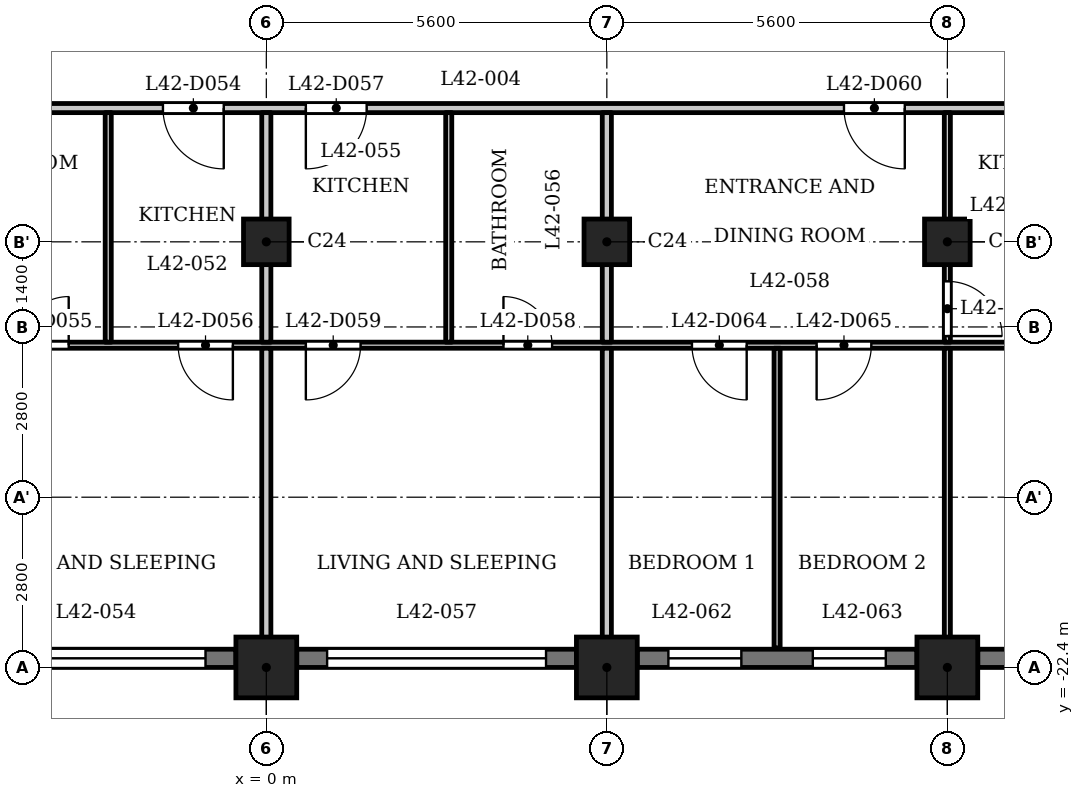
"""IFC4 building model, lengths in metres.
Left out: names, types, materials, properties, quantities, classifications, styles, units other than length and angle.
Written with IfcOpenShell. Run it as: python <this file> out.ifc"""

import sys

from ifc_helpers import new_model, si_unit, direction, frame, frame_2d, origin, origin_2d, place, context, subcontext, project, spatial, rectangle, extrude, element, fill, save


model = new_model("IFC4")
c1 = context("Model", 3, precision=1e-05, world=origin(), true_north=direction((0.0, 1.0)))
c2 = subcontext(c1, "Body", "Model", "MODEL_VIEW")
j1 = project(units=[si_unit("LENGTHUNIT", "METRE"), si_unit("PLANEANGLEUNIT", "RADIAN")], contexts=[c1])
p1 = place(None, origin())
s1 = spatial("IfcSite", under=j1, at=p1, CompositionType="ELEMENT")
p2 = place(p1, origin())
s2 = spatial("IfcBuilding", under=s1, at=p2, CompositionType="ELEMENT")
p3 = place(p2, frame((0.0, 0.0, 164.1)))
s3 = spatial("IfcBuildingStorey", under=s2, at=p3, CompositionType="ELEMENT", Elevation=164.1)
for number, where, z_axis, x_axis in (
    (1, (0.0, -22.4, 0.0), (0.0, 0.0, 1.0), (1.0, 0.0, 0.0)),
    (2, (5.6, -22.4, 0.0), (0.0, 0.0, 1.0), (1.0, 0.0, 0.0)),
    (3, (11.2, -22.4, 0.0), (0.0, 0.0, 1.0), (1.0, 0.0, 0.0)),
):
    element("IfcColumn", number, at=place(p3, frame(where, z_axis=z_axis, x_axis=x_axis)), inside=s3, PredefinedType="COLUMN", context=c2, shape_type="SweptSolid", body=[
        extrude(rectangle(XDim=1.0, YDim=1.0, at=origin_2d()), origin(), (0.0, 0.0, 1.0), 3.5),
    ])
for number, where, z_axis, x_axis in (
    (4, (0.0, -15.4, 0.0), (0.0, 0.0, 1.0), (1.0, 0.0, 0.0)),
    (5, (5.6, -15.4, 0.0), (0.0, 0.0, 1.0), (1.0, 0.0, 0.0)),
    (6, (11.2, -15.4, 0.0), (0.0, 0.0, 1.0), (1.0, 0.0, 0.0)),
):
    element("IfcColumn", number, at=place(p3, frame(where, z_axis=z_axis, x_axis=x_axis)), inside=s3, PredefinedType="COLUMN", context=c2, shape_type="SweptSolid", body=[
        extrude(rectangle(XDim=0.75, YDim=0.75, at=origin_2d()), origin(), (0.0, 0.0, 1.0), 3.5),
    ])
p4 = place(p3, frame((-5.1, -22.25, 0.0), z_axis=(0.0, 0.0, 1.0), x_axis=(1.0, 0.0, 0.0)))
e7 = element("IfcWall", 7, at=p4, inside=s3, PredefinedType="SOLIDWALL", context=c2, shape_type="SweptSolid", body=[
    extrude(rectangle(XDim=4.6, YDim=0.3, at=frame_2d((2.3, 0.0))), origin(), (0.0, 0.0, 1.0), 2.45),
])
p5 = place(p4, frame((0.5, 0.0, 1.2)))
e8 = element("IfcOpeningElement", 8, at=p5, cuts=e7, PredefinedType="OPENING", context=c2, shape_type="SweptSolid", body=[
    extrude(rectangle(XDim=3.6, YDim=0.95, at=frame_2d((1.8, 0.475))), frame((0.0, 0.16, 0.0), z_axis=(0.0, -1.0, 0.0), x_axis=(1.0, 0.0, 0.0)), (0.0, 0.0, 1.0), 0.32),
])
p6 = place(p3, frame((0.5, -22.25, 0.0), z_axis=(0.0, 0.0, 1.0), x_axis=(1.0, 0.0, 0.0)))
e9 = element("IfcWall", 9, at=p6, inside=s3, PredefinedType="SOLIDWALL", context=c2, shape_type="SweptSolid", body=[
    extrude(rectangle(XDim=4.6, YDim=0.3, at=frame_2d((2.3, 0.0))), origin(), (0.0, 0.0, 1.0), 2.45),
])
p7 = place(p6, frame((0.5, 0.0, 1.2)))
e10 = element("IfcOpeningElement", 10, at=p7, cuts=e9, PredefinedType="OPENING", context=c2, shape_type="SweptSolid", body=[
    extrude(rectangle(XDim=3.6, YDim=0.95, at=frame_2d((1.8, 0.475))), frame((0.0, 0.16, 0.0), z_axis=(0.0, -1.0, 0.0), x_axis=(1.0, 0.0, 0.0)), (0.0, 0.0, 1.0), 0.32),
])
p8 = place(p3, frame((6.1, -22.25, 0.0), z_axis=(0.0, 0.0, 1.0), x_axis=(1.0, 0.0, 0.0)))
e11 = element("IfcWall", 11, at=p8, inside=s3, PredefinedType="SOLIDWALL", context=c2, shape_type="SweptSolid", body=[
    extrude(rectangle(XDim=4.6, YDim=0.3, at=frame_2d((2.3, 0.0))), origin(), (0.0, 0.0, 1.0), 2.45),
])
p9 = place(p8, frame((0.512, 0.0, 0.6)))
e12 = element("IfcOpeningElement", 12, at=p9, cuts=e11, PredefinedType="OPENING", context=c2, shape_type="SweptSolid", body=[
    extrude(rectangle(XDim=1.2, YDim=1.55, at=frame_2d((0.6, 0.775))), frame((0.0, 0.16, 0.0), z_axis=(0.0, -1.0, 0.0), x_axis=(1.0, 0.0, 0.0)), (0.0, 0.0, 1.0), 0.32),
])
p10 = place(p8, frame((2.887, 0.0, 0.6)))
e13 = element("IfcOpeningElement", 13, at=p10, cuts=e11, PredefinedType="OPENING", context=c2, shape_type="SweptSolid", body=[
    extrude(rectangle(XDim=1.2, YDim=1.55, at=frame_2d((0.6, 0.775))), frame((0.0, 0.16, 0.0), z_axis=(0.0, -1.0, 0.0), x_axis=(1.0, 0.0, 0.0)), (0.0, 0.0, 1.0), 0.32),
])
p11 = place(p3, frame((11.7, -22.25, 0.0), z_axis=(0.0, 0.0, 1.0), x_axis=(1.0, 0.0, 0.0)))
e14 = element("IfcWall", 14, at=p11, inside=s3, PredefinedType="SOLIDWALL", context=c2, shape_type="SweptSolid", body=[
    extrude(rectangle(XDim=4.6, YDim=0.3, at=frame_2d((2.3, 0.0))), origin(), (0.0, 0.0, 1.0), 2.45),
])
p12 = place(p11, frame((0.5, 0.0, 1.2)))
e15 = element("IfcOpeningElement", 15, at=p12, cuts=e14, PredefinedType="OPENING", context=c2, shape_type="SweptSolid", body=[
    extrude(rectangle(XDim=3.6, YDim=0.95, at=frame_2d((1.8, 0.475))), frame((0.0, 0.16, 0.0), z_axis=(0.0, -1.0, 0.0), x_axis=(1.0, 0.0, 0.0)), (0.0, 0.0, 1.0), 0.32),
])
p13 = place(p3, frame((-16.725, -17.1, 0.0), z_axis=(0.0, 0.0, 1.0), x_axis=(1.0, 0.0, 0.0)))
e16 = element("IfcWall", 16, at=p13, inside=s3, PredefinedType="PARTITIONING", context=c2, shape_type="SweptSolid", body=[
    extrude(rectangle(XDim=33.45, YDim=0.1, at=frame_2d((16.725, 0.0))), origin(), (0.0, 0.0, 1.0), 3.2),
])
p14 = place(p13, frame((0.725, 0.0, 0.0)))
e17 = element("IfcOpeningElement", 17, at=p14, cuts=e16, PredefinedType="OPENING", context=c2, shape_type="SweptSolid", body=[
    extrude(rectangle(XDim=0.8, YDim=2.1, at=frame_2d((0.4, 1.05))), frame((0.0, 0.06, 0.0), z_axis=(0.0, -1.0, 0.0), x_axis=(1.0, 0.0, 0.0)), (0.0, 0.0, 1.0), 0.12),
])
p15 = place(p13, frame((3.175, 0.0, 0.0)))
e18 = element("IfcOpeningElement", 18, at=p15, cuts=e16, PredefinedType="OPENING", context=c2, shape_type="SweptSolid", body=[
    extrude(rectangle(XDim=0.9, YDim=2.1, at=frame_2d((0.45, 1.05))), frame((0.0, 0.06, 0.0), z_axis=(0.0, -1.0, 0.0), x_axis=(1.0, 0.0, 0.0)), (0.0, 0.0, 1.0), 0.12),
])
p16 = place(p13, frame((6.075, 0.0, 0.0)))
e19 = element("IfcOpeningElement", 19, at=p16, cuts=e16, PredefinedType="OPENING", context=c2, shape_type="SweptSolid", body=[
    extrude(rectangle(XDim=0.8, YDim=2.1, at=frame_2d((0.4, 1.05))), frame((0.0, 0.06, 0.0), z_axis=(0.0, -1.0, 0.0), x_axis=(1.0, 0.0, 0.0)), (0.0, 0.0, 1.0), 0.12),
])
p17 = place(p13, frame((9.425, 0.0, 0.0)))
e20 = element("IfcOpeningElement", 20, at=p17, cuts=e16, PredefinedType="OPENING", context=c2, shape_type="SweptSolid", body=[
    extrude(rectangle(XDim=0.9, YDim=2.1, at=frame_2d((0.45, 1.05))), frame((0.0, 0.06, 0.0), z_axis=(0.0, -1.0, 0.0), x_axis=(1.0, 0.0, 0.0)), (0.0, 0.0, 1.0), 0.12),
])
p18 = place(p13, frame((12.675, 0.0, 0.0)))
e21 = element("IfcOpeningElement", 21, at=p18, cuts=e16, PredefinedType="OPENING", context=c2, shape_type="SweptSolid", body=[
    extrude(rectangle(XDim=0.8, YDim=2.1, at=frame_2d((0.4, 1.05))), frame((0.0, 0.06, 0.0), z_axis=(0.0, -1.0, 0.0), x_axis=(1.0, 0.0, 0.0)), (0.0, 0.0, 1.0), 0.12),
])
p19 = place(p13, frame((15.275, 0.0, 0.0)))
e22 = element("IfcOpeningElement", 22, at=p19, cuts=e16, PredefinedType="OPENING", context=c2, shape_type="SweptSolid", body=[
    extrude(rectangle(XDim=0.9, YDim=2.1, at=frame_2d((0.45, 1.05))), frame((0.0, 0.06, 0.0), z_axis=(0.0, -1.0, 0.0), x_axis=(1.0, 0.0, 0.0)), (0.0, 0.0, 1.0), 0.12),
])
p20 = place(p13, frame((20.625, 0.0, 0.0)))
e23 = element("IfcOpeningElement", 23, at=p20, cuts=e16, PredefinedType="OPENING", context=c2, shape_type="SweptSolid", body=[
    extrude(rectangle(XDim=0.8, YDim=2.1, at=frame_2d((0.4, 1.05))), frame((0.0, 0.06, 0.0), z_axis=(0.0, -1.0, 0.0), x_axis=(1.0, 0.0, 0.0)), (0.0, 0.0, 1.0), 0.12),
])
p21 = place(p13, frame((17.375, 0.0, 0.0)))
e24 = element("IfcOpeningElement", 24, at=p21, cuts=e16, PredefinedType="OPENING", context=c2, shape_type="SweptSolid", body=[
    extrude(rectangle(XDim=0.9, YDim=2.1, at=frame_2d((0.45, 1.05))), frame((0.0, 0.06, 0.0), z_axis=(0.0, -1.0, 0.0), x_axis=(1.0, 0.0, 0.0)), (0.0, 0.0, 1.0), 0.12),
])
p22 = place(p13, frame((31.075, 0.0, 0.0)))
e25 = element("IfcOpeningElement", 25, at=p22, cuts=e16, PredefinedType="OPENING", context=c2, shape_type="SweptSolid", body=[
    extrude(rectangle(XDim=0.8, YDim=2.1, at=frame_2d((0.4, 1.05))), frame((0.0, 0.06, 0.0), z_axis=(0.0, -1.0, 0.0), x_axis=(1.0, 0.0, 0.0)), (0.0, 0.0, 1.0), 0.12),
])
p23 = place(p13, frame((29.325, 0.0, 0.0)))
e26 = element("IfcOpeningElement", 26, at=p23, cuts=e16, PredefinedType="OPENING", context=c2, shape_type="SweptSolid", body=[
    extrude(rectangle(XDim=0.9, YDim=2.1, at=frame_2d((0.45, 1.05))), frame((0.0, 0.06, 0.0), z_axis=(0.0, -1.0, 0.0), x_axis=(1.0, 0.0, 0.0)), (0.0, 0.0, 1.0), 0.12),
])
p24 = place(p13, frame((23.725, 0.0, 0.0)))
e27 = element("IfcOpeningElement", 27, at=p24, cuts=e16, PredefinedType="OPENING", context=c2, shape_type="SweptSolid", body=[
    extrude(rectangle(XDim=0.9, YDim=2.1, at=frame_2d((0.45, 1.05))), frame((0.0, 0.06, 0.0), z_axis=(0.0, -1.0, 0.0), x_axis=(1.0, 0.0, 0.0)), (0.0, 0.0, 1.0), 0.12),
])
p25 = place(p13, frame((25.775, 0.0, 0.0)))
e28 = element("IfcOpeningElement", 28, at=p25, cuts=e16, PredefinedType="OPENING", context=c2, shape_type="SweptSolid", body=[
    extrude(rectangle(XDim=0.9, YDim=2.1, at=frame_2d((0.45, 1.05))), frame((0.0, 0.06, 0.0), z_axis=(0.0, -1.0, 0.0), x_axis=(1.0, 0.0, 0.0)), (0.0, 0.0, 1.0), 0.12),
])
p26 = place(p3, frame((-17.4, -13.2, 0.0), z_axis=(0.0, 0.0, 1.0), x_axis=(1.0, 0.0, 0.0)))
e29 = element("IfcWall", 29, at=p26, inside=s3, PredefinedType="PARTITIONING", context=c2, shape_type="SweptSolid", body=[
    extrude(rectangle(XDim=34.8, YDim=0.15, at=frame_2d((17.4, 0.0))), origin(), (0.0, 0.0, 1.0), 3.2),
])
p27 = place(p26, frame((0.15, 0.0, 0.0)))
e30 = element("IfcOpeningElement", 30, at=p27, cuts=e29, PredefinedType="OPENING", context=c2, shape_type="SweptSolid", body=[
    extrude(rectangle(XDim=1.0, YDim=2.1, at=frame_2d((0.5, 1.05))), frame((0.0, 0.085, 0.0), z_axis=(0.0, -1.0, 0.0), x_axis=(1.0, 0.0, 0.0)), (0.0, 0.0, 1.0), 0.17),
])
p28 = place(p26, frame((33.55, 0.0, 0.0)))
e31 = element("IfcOpeningElement", 31, at=p28, cuts=e29, PredefinedType="OPENING", context=c2, shape_type="SweptSolid", body=[
    extrude(rectangle(XDim=1.0, YDim=2.1, at=frame_2d((0.5, 1.05))), frame((0.0, 0.085, 0.0), z_axis=(0.0, -1.0, 0.0), x_axis=(1.0, 0.0, 0.0)), (0.0, 0.0, 1.0), 0.17),
])
p29 = place(p26, frame((3.5, 0.0, 0.0)))
e32 = element("IfcOpeningElement", 32, at=p29, cuts=e29, PredefinedType="OPENING", context=c2, shape_type="SweptSolid", body=[
    extrude(rectangle(XDim=1.0, YDim=2.1, at=frame_2d((0.5, 1.05))), frame((0.0, 0.085, 0.0), z_axis=(0.0, -1.0, 0.0), x_axis=(1.0, 0.0, 0.0)), (0.0, 0.0, 1.0), 0.17),
])
p30 = place(p26, frame((10.1, 0.0, 0.0)))
e33 = element("IfcOpeningElement", 33, at=p30, cuts=e29, PredefinedType="OPENING", context=c2, shape_type="SweptSolid", body=[
    extrude(rectangle(XDim=1.0, YDim=2.1, at=frame_2d((0.5, 1.05))), frame((0.0, 0.085, 0.0), z_axis=(0.0, -1.0, 0.0), x_axis=(1.0, 0.0, 0.0)), (0.0, 0.0, 1.0), 0.17),
])
p31 = place(p26, frame((15.7, 0.0, 0.0)))
e34 = element("IfcOpeningElement", 34, at=p31, cuts=e29, PredefinedType="OPENING", context=c2, shape_type="SweptSolid", body=[
    extrude(rectangle(XDim=1.0, YDim=2.1, at=frame_2d((0.5, 1.05))), frame((0.0, 0.085, 0.0), z_axis=(0.0, -1.0, 0.0), x_axis=(1.0, 0.0, 0.0)), (0.0, 0.0, 1.0), 0.17),
])
p32 = place(p26, frame((18.05, 0.0, 0.0)))
e35 = element("IfcOpeningElement", 35, at=p32, cuts=e29, PredefinedType="OPENING", context=c2, shape_type="SweptSolid", body=[
    extrude(rectangle(XDim=1.0, YDim=2.1, at=frame_2d((0.5, 1.05))), frame((0.0, 0.085, 0.0), z_axis=(0.0, -1.0, 0.0), x_axis=(1.0, 0.0, 0.0)), (0.0, 0.0, 1.0), 0.17),
])
p33 = place(p26, frame((26.9, 0.0, 0.0)))
e36 = element("IfcOpeningElement", 36, at=p33, cuts=e29, PredefinedType="OPENING", context=c2, shape_type="SweptSolid", body=[
    extrude(rectangle(XDim=1.0, YDim=2.1, at=frame_2d((0.5, 1.05))), frame((0.0, 0.085, 0.0), z_axis=(0.0, -1.0, 0.0), x_axis=(1.0, 0.0, 0.0)), (0.0, 0.0, 1.0), 0.17),
])
p34 = place(p3, frame((-2.6, -17.05, 0.0), z_axis=(0.0, 0.0, 1.0), x_axis=(0.0, 1.0, 0.0)))
e37 = element("IfcWall", 37, at=p34, inside=s3, PredefinedType="PARTITIONING", context=c2, shape_type="SweptSolid", body=[
    extrude(rectangle(XDim=3.775, YDim=0.1, at=frame_2d((1.888, 0.0))), origin(), (0.0, 0.0, 1.0), 3.2),
])
p35 = place(p3, frame((0.0, -22.88, 0.0), z_axis=(0.0, 0.0, 1.0), x_axis=(0.0, 1.0, 0.0)))
e38 = element("IfcWall", 38, at=p35, inside=s3, PredefinedType="PARTITIONING", context=c2, shape_type="SweptSolid", body=[
    extrude(rectangle(XDim=5.73, YDim=0.15, at=frame_2d((2.865, 0.0))), origin(), (0.0, 0.0, 1.0), 3.2),
])
p36 = place(p3, frame((0.0, -17.05, 0.0), z_axis=(0.0, 0.0, 1.0), x_axis=(0.0, 1.0, 0.0)))
e39 = element("IfcWall", 39, at=p36, inside=s3, PredefinedType="PARTITIONING", context=c2, shape_type="SweptSolid", body=[
    extrude(rectangle(XDim=3.775, YDim=0.15, at=frame_2d((1.888, 0.0))), origin(), (0.0, 0.0, 1.0), 3.2),
])
p37 = place(p3, frame((3.0, -17.05, 0.0), z_axis=(0.0, 0.0, 1.0), x_axis=(0.0, 1.0, 0.0)))
e40 = element("IfcWall", 40, at=p37, inside=s3, PredefinedType="PARTITIONING", context=c2, shape_type="SweptSolid", body=[
    extrude(rectangle(XDim=3.775, YDim=0.1, at=frame_2d((1.888, 0.0))), origin(), (0.0, 0.0, 1.0), 3.2),
])
p38 = place(p3, frame((5.6, -22.88, 0.0), z_axis=(0.0, 0.0, 1.0), x_axis=(0.0, 1.0, 0.0)))
e41 = element("IfcWall", 41, at=p38, inside=s3, PredefinedType="PARTITIONING", context=c2, shape_type="SweptSolid", body=[
    extrude(rectangle(XDim=5.73, YDim=0.15, at=frame_2d((2.865, 0.0))), origin(), (0.0, 0.0, 1.0), 3.2),
])
p39 = place(p3, frame((5.6, -17.05, 0.0), z_axis=(0.0, 0.0, 1.0), x_axis=(0.0, 1.0, 0.0)))
e42 = element("IfcWall", 42, at=p39, inside=s3, PredefinedType="PARTITIONING", context=c2, shape_type="SweptSolid", body=[
    extrude(rectangle(XDim=3.775, YDim=0.15, at=frame_2d((1.888, 0.0))), origin(), (0.0, 0.0, 1.0), 3.2),
])
p40 = place(p3, frame((8.4, -22.08, 0.0), z_axis=(0.0, 0.0, 1.0), x_axis=(0.0, 1.0, 0.0)))
e43 = element("IfcWall", 43, at=p40, inside=s3, PredefinedType="PARTITIONING", context=c2, shape_type="SweptSolid", body=[
    extrude(rectangle(XDim=4.93, YDim=0.1, at=frame_2d((2.465, 0.0))), origin(), (0.0, 0.0, 1.0), 3.2),
])
p41 = place(p3, frame((11.2, -22.88, 0.0), z_axis=(0.0, 0.0, 1.0), x_axis=(0.0, 1.0, 0.0)))
e44 = element("IfcWall", 44, at=p41, inside=s3, PredefinedType="PARTITIONING", context=c2, shape_type="SweptSolid", body=[
    extrude(rectangle(XDim=5.73, YDim=0.1, at=frame_2d((2.865, 0.0))), origin(), (0.0, 0.0, 1.0), 3.2),
])
p42 = place(p3, frame((11.2, -17.05, 0.0), z_axis=(0.0, 0.0, 1.0), x_axis=(0.0, 1.0, 0.0)))
e45 = element("IfcWall", 45, at=p42, inside=s3, PredefinedType="PARTITIONING", context=c2, shape_type="SweptSolid", body=[
    extrude(rectangle(XDim=3.775, YDim=0.1, at=frame_2d((1.888, 0.0))), origin(), (0.0, 0.0, 1.0), 3.2),
])
p43 = place(p42, frame((0.1, 0.0, 0.0)))
e46 = element("IfcOpeningElement", 46, at=p43, cuts=e45, PredefinedType="OPENING", context=c2, shape_type="SweptSolid", body=[
    extrude(rectangle(XDim=0.9, YDim=2.1, at=frame_2d((0.45, 1.05))), frame((0.0, 0.06, 0.0), z_axis=(0.0, -1.0, 0.0), x_axis=(1.0, 0.0, 0.0)), (0.0, 0.0, 1.0), 0.12),
])
p44 = place(p31, origin())
e47 = element("IfcDoor", 47, at=p44, inside=s3, OperationType="SINGLE_SWING_RIGHT", PredefinedType="DOOR", context=c2, shape_type="SweptSolid", body=[
    extrude(rectangle(XDim=1.0, YDim=2.1, at=frame_2d((0.5, 1.05))), frame((0.0, 0.025, 0.0), z_axis=(0.0, -1.0, 0.0), x_axis=(1.0, 0.0, 0.0)), (0.0, 0.0, 1.0), 0.05),
])
fill(e34, e47)
p45 = place(p18, origin())
e48 = element("IfcDoor", 48, at=p45, inside=s3, OperationType="SINGLE_SWING_LEFT", PredefinedType="DOOR", context=c2, shape_type="SweptSolid", body=[
    extrude(rectangle(XDim=0.8, YDim=2.1, at=frame_2d((0.4, 1.05))), frame((0.0, 0.025, 0.0), z_axis=(0.0, -1.0, 0.0), x_axis=(1.0, 0.0, 0.0)), (0.0, 0.0, 1.0), 0.05),
])
fill(e21, e48)
p46 = place(p19, origin())
e49 = element("IfcDoor", 49, at=p46, inside=s3, OperationType="SINGLE_SWING_RIGHT", PredefinedType="DOOR", context=c2, shape_type="SweptSolid", body=[
    extrude(rectangle(XDim=0.9, YDim=2.1, at=frame_2d((0.45, 1.05))), frame((0.0, 0.025, 0.0), z_axis=(0.0, -1.0, 0.0), x_axis=(1.0, 0.0, 0.0)), (0.0, 0.0, 1.0), 0.05),
])
fill(e22, e49)
p47 = place(p32, origin())
e50 = element("IfcDoor", 50, at=p47, inside=s3, OperationType="SINGLE_SWING_LEFT", PredefinedType="DOOR", context=c2, shape_type="SweptSolid", body=[
    extrude(rectangle(XDim=1.0, YDim=2.1, at=frame_2d((0.5, 1.05))), frame((0.0, 0.025, 0.0), z_axis=(0.0, -1.0, 0.0), x_axis=(1.0, 0.0, 0.0)), (0.0, 0.0, 1.0), 0.05),
])
fill(e35, e50)
p48 = place(p20, origin())
e51 = element("IfcDoor", 51, at=p48, inside=s3, OperationType="SINGLE_SWING_RIGHT", PredefinedType="DOOR", context=c2, shape_type="SweptSolid", body=[
    extrude(rectangle(XDim=0.8, YDim=2.1, at=frame_2d((0.4, 1.05))), frame((0.0, 0.025, 0.0), z_axis=(0.0, -1.0, 0.0), x_axis=(1.0, 0.0, 0.0)), (0.0, 0.0, 1.0), 0.05),
])
fill(e23, e51)
p49 = place(p21, origin())
e52 = element("IfcDoor", 52, at=p49, inside=s3, OperationType="SINGLE_SWING_LEFT", PredefinedType="DOOR", context=c2, shape_type="SweptSolid", body=[
    extrude(rectangle(XDim=0.9, YDim=2.1, at=frame_2d((0.45, 1.05))), frame((0.0, 0.025, 0.0), z_axis=(0.0, -1.0, 0.0), x_axis=(1.0, 0.0, 0.0)), (0.0, 0.0, 1.0), 0.05),
])
fill(e24, e52)
p50 = place(p33, origin())
e53 = element("IfcDoor", 53, at=p50, inside=s3, OperationType="SINGLE_SWING_RIGHT", PredefinedType="DOOR", context=c2, shape_type="SweptSolid", body=[
    extrude(rectangle(XDim=1.0, YDim=2.1, at=frame_2d((0.5, 1.05))), frame((0.0, 0.025, 0.0), z_axis=(0.0, -1.0, 0.0), x_axis=(1.0, 0.0, 0.0)), (0.0, 0.0, 1.0), 0.05),
])
fill(e36, e53)
p51 = place(p43, origin())
e54 = element("IfcDoor", 54, at=p51, inside=s3, OperationType="SINGLE_SWING_LEFT", PredefinedType="DOOR", context=c2, shape_type="SweptSolid", body=[
    extrude(rectangle(XDim=0.9, YDim=2.1, at=frame_2d((0.45, 1.05))), frame((0.0, 0.025, 0.0), z_axis=(0.0, -1.0, 0.0), x_axis=(1.0, 0.0, 0.0)), (0.0, 0.0, 1.0), 0.05),
])
fill(e46, e54)
p52 = place(p24, origin())
e55 = element("IfcDoor", 55, at=p52, inside=s3, OperationType="SINGLE_SWING_RIGHT", PredefinedType="DOOR", context=c2, shape_type="SweptSolid", body=[
    extrude(rectangle(XDim=0.9, YDim=2.1, at=frame_2d((0.45, 1.05))), frame((0.0, 0.025, 0.0), z_axis=(0.0, -1.0, 0.0), x_axis=(1.0, 0.0, 0.0)), (0.0, 0.0, 1.0), 0.05),
])
fill(e27, e55)
p53 = place(p25, origin())
e56 = element("IfcDoor", 56, at=p53, inside=s3, OperationType="SINGLE_SWING_LEFT", PredefinedType="DOOR", context=c2, shape_type="SweptSolid", body=[
    extrude(rectangle(XDim=0.9, YDim=2.1, at=frame_2d((0.45, 1.05))), frame((0.0, 0.025, 0.0), z_axis=(0.0, -1.0, 0.0), x_axis=(1.0, 0.0, 0.0)), (0.0, 0.0, 1.0), 0.05),
])
fill(e28, e56)
p54 = place(p5, origin())
e57 = element("IfcWindow", 57, at=p54, inside=s3, PartitioningType="SINGLE_PANEL", PredefinedType="WINDOW", context=c2, shape_type="SweptSolid", body=[
    extrude(rectangle(XDim=3.6, YDim=0.95, at=frame_2d((1.8, 0.475))), frame((0.0, 0.03, 0.0), z_axis=(0.0, -1.0, 0.0), x_axis=(1.0, 0.0, 0.0)), (0.0, 0.0, 1.0), 0.06),
])
fill(e8, e57)
p55 = place(p7, origin())
e58 = element("IfcWindow", 58, at=p55, inside=s3, PartitioningType="SINGLE_PANEL", PredefinedType="WINDOW", context=c2, shape_type="SweptSolid", body=[
    extrude(rectangle(XDim=3.6, YDim=0.95, at=frame_2d((1.8, 0.475))), frame((0.0, 0.03, 0.0), z_axis=(0.0, -1.0, 0.0), x_axis=(1.0, 0.0, 0.0)), (0.0, 0.0, 1.0), 0.06),
])
fill(e10, e58)
p56 = place(p9, origin())
e59 = element("IfcWindow", 59, at=p56, inside=s3, PartitioningType="SINGLE_PANEL", PredefinedType="WINDOW", context=c2, shape_type="SweptSolid", body=[
    extrude(rectangle(XDim=1.2, YDim=1.55, at=frame_2d((0.6, 0.775))), frame((0.0, 0.03, 0.0), z_axis=(0.0, -1.0, 0.0), x_axis=(1.0, 0.0, 0.0)), (0.0, 0.0, 1.0), 0.06),
])
fill(e12, e59)
p57 = place(p10, origin())
e60 = element("IfcWindow", 60, at=p57, inside=s3, PartitioningType="SINGLE_PANEL", PredefinedType="WINDOW", context=c2, shape_type="SweptSolid", body=[
    extrude(rectangle(XDim=1.2, YDim=1.55, at=frame_2d((0.6, 0.775))), frame((0.0, 0.03, 0.0), z_axis=(0.0, -1.0, 0.0), x_axis=(1.0, 0.0, 0.0)), (0.0, 0.0, 1.0), 0.06),
])
fill(e13, e60)
save(model, sys.argv[1])
